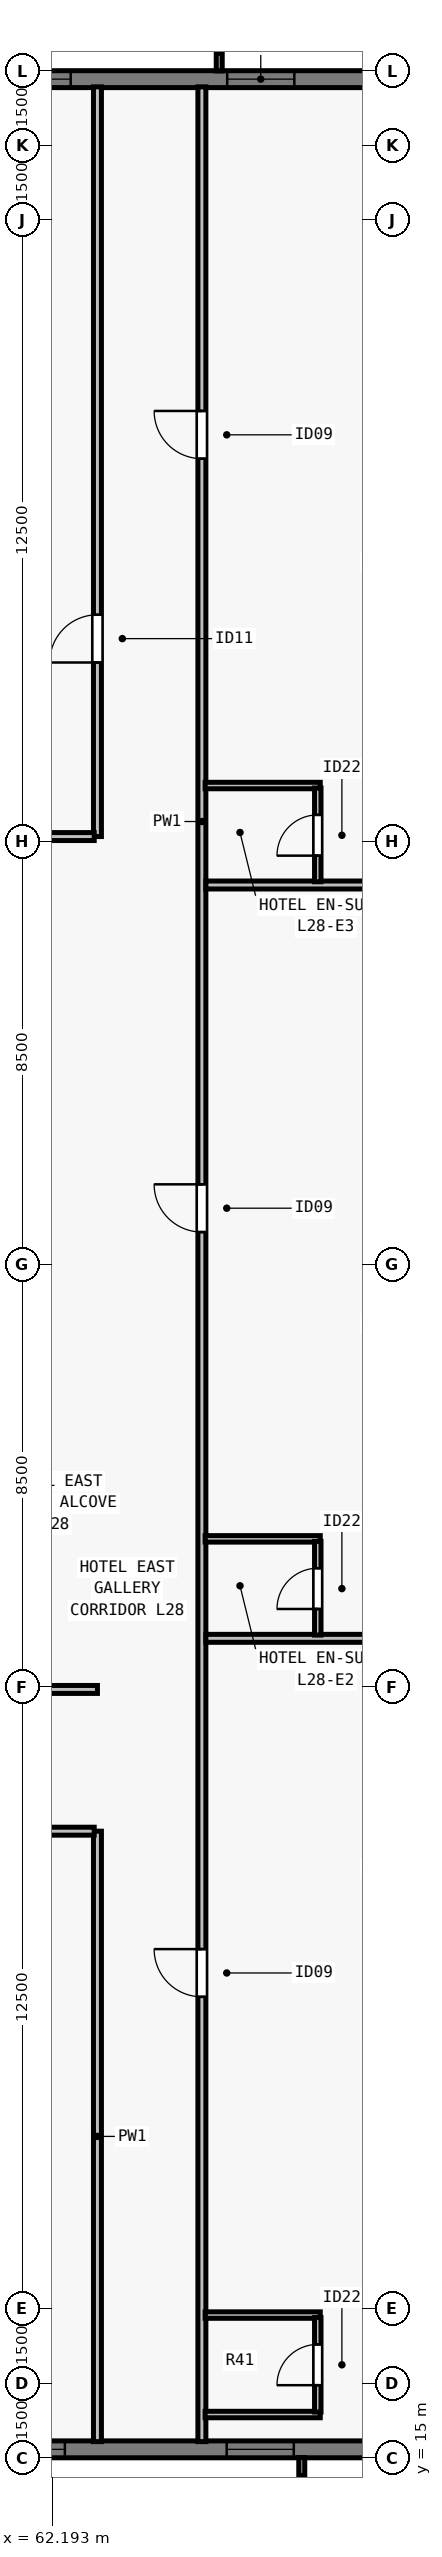
"""IFC4 building model, lengths in metres.
Left out: names, types, materials, properties, quantities, classifications, styles, units other than length and angle.
Written with IfcOpenShell. Run it as: python <this file> out.ifc"""

import sys

from ifc_helpers import new_model, si_unit, direction, frame, frame_2d, origin, place, context, subcontext, project, spatial, rectangle, extrude, element, fill, save


model = new_model("IFC4")
c1 = context("Model", 3, precision=1e-05, world=origin(), true_north=direction((0.0, 1.0)))
c2 = subcontext(c1, "Body", "Model", "MODEL_VIEW")
j1 = project(units=[si_unit("LENGTHUNIT", "METRE"), si_unit("PLANEANGLEUNIT", "RADIAN")], contexts=[c1])
p1 = place(None, origin())
s1 = spatial("IfcSite", under=j1, at=p1, CompositionType="ELEMENT")
p2 = place(p1, origin())
s2 = spatial("IfcBuilding", under=s1, at=p2, CompositionType="ELEMENT")
p3 = place(p2, frame((0.0, 0.0, 106.0)))
s3 = spatial("IfcBuildingStorey", under=s2, at=p3, CompositionType="ELEMENT", Elevation=106.0)
p4 = place(p3, frame((45.0, 62.83, 0.0), z_axis=(0.0, 0.0, 1.0), x_axis=(1.0, 0.0, 0.0)))
e1 = element("IfcWall", 1, at=p4, inside=s3, PredefinedType="SOLIDWALL", context=c2, shape_type="SweptSolid", body=[
    extrude(rectangle(XDim=26.682, YDim=0.34, at=frame_2d((13.341, 0.0))), origin(), (0.0, 0.0, 1.0), 3.28),
])
p5 = place(p4, frame((5.073, 0.0, 0.8)))
e2 = element("IfcOpeningElement", 2, at=p5, cuts=e1, PredefinedType="OPENING", context=c2, shape_type="SweptSolid", body=[
    extrude(rectangle(XDim=1.35, YDim=1.66, at=frame_2d((0.675, 0.83))), frame((0.0, 0.18, 0.0), z_axis=(0.0, -1.0, 0.0), x_axis=(1.0, 0.0, 0.0)), (0.0, 0.0, 1.0), 0.36),
])
p6 = place(p4, frame((8.219, 0.0, 0.8)))
e3 = element("IfcOpeningElement", 3, at=p6, cuts=e1, PredefinedType="OPENING", context=c2, shape_type="SweptSolid", body=[
    extrude(rectangle(XDim=1.75, YDim=1.66, at=frame_2d((0.875, 0.83))), frame((0.0, 0.18, 0.0), z_axis=(0.0, -1.0, 0.0), x_axis=(1.0, 0.0, 0.0)), (0.0, 0.0, 1.0), 0.36),
])
p7 = place(p4, frame((12.666, 0.0, 0.8)))
e4 = element("IfcOpeningElement", 4, at=p7, cuts=e1, PredefinedType="OPENING", context=c2, shape_type="SweptSolid", body=[
    extrude(rectangle(XDim=1.35, YDim=1.66, at=frame_2d((0.675, 0.83))), frame((0.0, 0.18, 0.0), z_axis=(0.0, -1.0, 0.0), x_axis=(1.0, 0.0, 0.0)), (0.0, 0.0, 1.0), 0.36),
])
p8 = place(p4, frame((15.812, 0.0, 0.8)))
e5 = element("IfcOpeningElement", 5, at=p8, cuts=e1, PredefinedType="OPENING", context=c2, shape_type="SweptSolid", body=[
    extrude(rectangle(XDim=1.75, YDim=1.66, at=frame_2d((0.875, 0.83))), frame((0.0, 0.18, 0.0), z_axis=(0.0, -1.0, 0.0), x_axis=(1.0, 0.0, 0.0)), (0.0, 0.0, 1.0), 0.36),
])
p9 = place(p4, frame((20.709, 0.0, 0.8)))
e6 = element("IfcOpeningElement", 6, at=p9, cuts=e1, PredefinedType="OPENING", context=c2, shape_type="SweptSolid", body=[
    extrude(rectangle(XDim=1.35, YDim=1.66, at=frame_2d((0.675, 0.83))), frame((0.0, 0.18, 0.0), z_axis=(0.0, -1.0, 0.0), x_axis=(1.0, 0.0, 0.0)), (0.0, 0.0, 1.0), 0.36),
])
p10 = place(p3, frame((72.0, 15.17, 0.0), z_axis=(0.0, 0.0, 1.0), x_axis=(-1.0, 0.0, 0.0)))
e7 = element("IfcWall", 7, at=p10, inside=s3, PredefinedType="SOLIDWALL", context=c2, shape_type="SweptSolid", body=[
    extrude(rectangle(XDim=39.682, YDim=0.34, at=frame_2d((19.841, 0.0))), origin(), (0.0, 0.0, 1.0), 3.28),
])
p11 = place(p10, frame((4.952, 0.0, 0.8)))
e8 = element("IfcOpeningElement", 8, at=p11, cuts=e7, PredefinedType="OPENING", context=c2, shape_type="SweptSolid", body=[
    extrude(rectangle(XDim=1.35, YDim=1.66, at=frame_2d((0.675, 0.83))), frame((0.0, 0.18, 0.0), z_axis=(0.0, -1.0, 0.0), x_axis=(1.0, 0.0, 0.0)), (0.0, 0.0, 1.0), 0.36),
])
p12 = place(p10, frame((9.555, 0.0, 0.8)))
e9 = element("IfcOpeningElement", 9, at=p12, cuts=e7, PredefinedType="OPENING", context=c2, shape_type="SweptSolid", body=[
    extrude(rectangle(XDim=1.75, YDim=1.66, at=frame_2d((0.875, 0.83))), frame((0.0, 0.18, 0.0), z_axis=(0.0, -1.0, 0.0), x_axis=(1.0, 0.0, 0.0)), (0.0, 0.0, 1.0), 0.36),
])
p13 = place(p10, frame((12.059, 0.0, 0.8)))
e10 = element("IfcOpeningElement", 10, at=p13, cuts=e7, PredefinedType="OPENING", context=c2, shape_type="SweptSolid", body=[
    extrude(rectangle(XDim=1.35, YDim=1.66, at=frame_2d((0.675, 0.83))), frame((0.0, 0.18, 0.0), z_axis=(0.0, -1.0, 0.0), x_axis=(1.0, 0.0, 0.0)), (0.0, 0.0, 1.0), 0.36),
])
p14 = place(p10, frame((16.262, 0.0, 0.8)))
e11 = element("IfcOpeningElement", 11, at=p14, cuts=e7, PredefinedType="OPENING", context=c2, shape_type="SweptSolid", body=[
    extrude(rectangle(XDim=1.75, YDim=1.66, at=frame_2d((0.875, 0.83))), frame((0.0, 0.18, 0.0), z_axis=(0.0, -1.0, 0.0), x_axis=(1.0, 0.0, 0.0)), (0.0, 0.0, 1.0), 0.36),
])
p15 = place(p10, frame((18.716, 0.0, 0.8)))
e12 = element("IfcOpeningElement", 12, at=p15, cuts=e7, PredefinedType="OPENING", context=c2, shape_type="SweptSolid", body=[
    extrude(rectangle(XDim=1.35, YDim=1.66, at=frame_2d((0.675, 0.83))), frame((0.0, 0.18, 0.0), z_axis=(0.0, -1.0, 0.0), x_axis=(1.0, 0.0, 0.0)), (0.0, 0.0, 1.0), 0.36),
])
p16 = place(p10, frame((22.07, 0.0, 0.8)))
e13 = element("IfcOpeningElement", 13, at=p16, cuts=e7, PredefinedType="OPENING", context=c2, shape_type="SweptSolid", body=[
    extrude(rectangle(XDim=1.75, YDim=1.66, at=frame_2d((0.875, 0.83))), frame((0.0, 0.18, 0.0), z_axis=(0.0, -1.0, 0.0), x_axis=(1.0, 0.0, 0.0)), (0.0, 0.0, 1.0), 0.36),
])
p17 = place(p10, frame((26.273, 0.0, 0.8)))
e14 = element("IfcOpeningElement", 14, at=p17, cuts=e7, PredefinedType="OPENING", context=c2, shape_type="SweptSolid", body=[
    extrude(rectangle(XDim=1.35, YDim=1.66, at=frame_2d((0.675, 0.83))), frame((0.0, 0.18, 0.0), z_axis=(0.0, -1.0, 0.0), x_axis=(1.0, 0.0, 0.0)), (0.0, 0.0, 1.0), 0.36),
])
p18 = place(p10, frame((28.777, 0.0, 0.8)))
e15 = element("IfcOpeningElement", 15, at=p18, cuts=e7, PredefinedType="OPENING", context=c2, shape_type="SweptSolid", body=[
    extrude(rectangle(XDim=1.75, YDim=1.66, at=frame_2d((0.875, 0.83))), frame((0.0, 0.18, 0.0), z_axis=(0.0, -1.0, 0.0), x_axis=(1.0, 0.0, 0.0)), (0.0, 0.0, 1.0), 0.36),
])
p19 = place(p10, frame((33.83, 0.0, 0.8)))
e16 = element("IfcOpeningElement", 16, at=p19, cuts=e7, PredefinedType="OPENING", context=c2, shape_type="SweptSolid", body=[
    extrude(rectangle(XDim=1.35, YDim=1.66, at=frame_2d((0.675, 0.83))), frame((0.0, 0.18, 0.0), z_axis=(0.0, -1.0, 0.0), x_axis=(1.0, 0.0, 0.0)), (0.0, 0.0, 1.0), 0.36),
])
p20 = place(p3, frame((65.2, 15.325, 0.0), z_axis=(0.0, 0.0, 1.0), x_axis=(0.0, 1.0, 0.0)))
e17 = element("IfcWall", 17, at=p20, inside=s3, PredefinedType="PARTITIONING", context=c2, shape_type="SweptSolid", body=[
    extrude(rectangle(XDim=47.35, YDim=0.16, at=frame_2d((23.675, 0.0))), origin(), (0.0, 0.0, 1.0), 2.555),
])
p21 = place(p20, frame((8.944, 0.0, 0.0)))
e18 = element("IfcOpeningElement", 18, at=p21, cuts=e17, PredefinedType="OPENING", context=c2, shape_type="SweptSolid", body=[
    extrude(rectangle(XDim=0.96, YDim=2.15, at=frame_2d((0.48, 1.075))), frame((0.0, 0.09, 0.0), z_axis=(0.0, -1.0, 0.0), x_axis=(1.0, 0.0, 0.0)), (0.0, 0.0, 1.0), 0.18),
])
p22 = place(p20, frame((24.322, 0.0, 0.0)))
e19 = element("IfcOpeningElement", 19, at=p22, cuts=e17, PredefinedType="OPENING", context=c2, shape_type="SweptSolid", body=[
    extrude(rectangle(XDim=0.96, YDim=2.15, at=frame_2d((0.48, 1.075))), frame((0.0, 0.09, 0.0), z_axis=(0.0, -1.0, 0.0), x_axis=(1.0, 0.0, 0.0)), (0.0, 0.0, 1.0), 0.18),
])
p23 = place(p20, frame((39.873, 0.0, 0.0)))
e20 = element("IfcOpeningElement", 20, at=p23, cuts=e17, PredefinedType="OPENING", context=c2, shape_type="SweptSolid", body=[
    extrude(rectangle(XDim=0.96, YDim=2.15, at=frame_2d((0.48, 1.075))), frame((0.0, 0.09, 0.0), z_axis=(0.0, -1.0, 0.0), x_axis=(1.0, 0.0, 0.0)), (0.0, 0.0, 1.0), 0.18),
])
p24 = place(p3, frame((63.1, 15.325, 0.0), z_axis=(0.0, 0.0, 1.0), x_axis=(0.0, 1.0, 0.0)))
e21 = element("IfcWall", 21, at=p24, inside=s3, PredefinedType="PARTITIONING", context=c2, shape_type="SweptSolid", body=[
    extrude(rectangle(XDim=12.275, YDim=0.16, at=frame_2d((6.138, 0.0))), origin(), (0.0, 0.0, 1.0), 2.555),
])
p25 = place(p3, frame((63.1, 47.6, 0.0), z_axis=(0.0, 0.0, 1.0), x_axis=(0.0, 1.0, 0.0)))
e22 = element("IfcWall", 22, at=p25, inside=s3, PredefinedType="PARTITIONING", context=c2, shape_type="SweptSolid", body=[
    extrude(rectangle(XDim=15.075, YDim=0.16, at=frame_2d((7.538, 0.0))), origin(), (0.0, 0.0, 1.0), 2.555),
])
p26 = place(p25, frame((3.5, 0.0, 0.0)))
e23 = element("IfcOpeningElement", 23, at=p26, cuts=e22, PredefinedType="OPENING", context=c2, shape_type="SweptSolid", body=[
    extrude(rectangle(XDim=0.96, YDim=2.12, at=frame_2d((0.48, 1.06))), frame((0.0, 0.09, 0.0), z_axis=(0.0, -1.0, 0.0), x_axis=(1.0, 0.0, 0.0)), (0.0, 0.0, 1.0), 0.18),
])
p27 = place(p3, frame((60.765, 30.45, 0.0), z_axis=(0.0, 0.0, 1.0), x_axis=(1.0, 0.0, 0.0)))
e24 = element("IfcWall", 24, at=p27, inside=s3, PredefinedType="PARTITIONING", context=c2, shape_type="SweptSolid", body=[
    extrude(rectangle(XDim=2.335, YDim=0.16, at=frame_2d((1.167, 0.0))), origin(), (0.0, 0.0, 1.0), 3.28),
])
p28 = place(p3, frame((60.765, 47.6, 0.0), z_axis=(0.0, 0.0, 1.0), x_axis=(1.0, 0.0, 0.0)))
e25 = element("IfcWall", 25, at=p28, inside=s3, PredefinedType="PARTITIONING", context=c2, shape_type="SweptSolid", body=[
    extrude(rectangle(XDim=2.27, YDim=0.16, at=frame_2d((1.135, 0.0))), origin(), (0.0, 0.0, 1.0), 3.28),
])
p29 = place(p3, frame((40.965, 27.6, 0.0), z_axis=(0.0, 0.0, 1.0), x_axis=(1.0, 0.0, 0.0)))
e26 = element("IfcWall", 26, at=p29, inside=s3, PredefinedType="PARTITIONING", context=c2, shape_type="SweptSolid", body=[
    extrude(rectangle(XDim=22.07, YDim=0.16, at=frame_2d((11.035, 0.0))), origin(), (0.0, 0.0, 1.0), 3.28),
])
p30 = place(p29, frame((6.085, 0.0, 0.0)))
e27 = element("IfcOpeningElement", 27, at=p30, cuts=e26, PredefinedType="OPENING", context=c2, shape_type="SweptSolid", body=[
    extrude(rectangle(XDim=0.96, YDim=2.15, at=frame_2d((0.48, 1.075))), frame((0.0, 0.09, 0.0), z_axis=(0.0, -1.0, 0.0), x_axis=(1.0, 0.0, 0.0)), (0.0, 0.0, 1.0), 0.18),
])
p31 = place(p29, frame((16.88, 0.0, 0.0)))
e28 = element("IfcOpeningElement", 28, at=p31, cuts=e26, PredefinedType="OPENING", context=c2, shape_type="SweptSolid", body=[
    extrude(rectangle(XDim=0.96, YDim=2.15, at=frame_2d((0.48, 1.075))), frame((0.0, 0.09, 0.0), z_axis=(0.0, -1.0, 0.0), x_axis=(1.0, 0.0, 0.0)), (0.0, 0.0, 1.0), 0.18),
])
for number, where, z_axis, x_axis in (
    (29, (65.265, 15.87, 0.0), (0.0, 0.0, 1.0), (1.0, 0.0, 0.0)),
    (30, (65.265, 17.87, 0.0), (0.0, 0.0, 1.0), (1.0, 0.0, 0.0)),
):
    element("IfcWall", number, at=place(p3, frame(where, z_axis=z_axis, x_axis=x_axis)), inside=s3, PredefinedType="PLUMBINGWALL", context=c2, shape_type="SweptSolid", body=[
        extrude(rectangle(XDim=2.315, YDim=0.13, at=frame_2d((1.158, 0.0))), origin(), (0.0, 0.0, 1.0), 3.28),
    ])
p32 = place(p3, frame((67.53, 15.92, 0.0), z_axis=(0.0, 0.0, 1.0), x_axis=(0.0, 1.0, 0.0)))
e31 = element("IfcWall", 31, at=p32, inside=s3, PredefinedType="PLUMBINGWALL", context=c2, shape_type="SweptSolid", body=[
    extrude(rectangle(XDim=1.9, YDim=0.13, at=frame_2d((0.95, 0.0))), origin(), (0.0, 0.0, 1.0), 3.28),
])
p33 = place(p32, frame((0.54, 0.0, 0.0)))
e32 = element("IfcOpeningElement", 32, at=p33, cuts=e31, PredefinedType="OPENING", context=c2, shape_type="SweptSolid", body=[
    extrude(rectangle(XDim=0.82, YDim=2.1, at=frame_2d((0.41, 1.05))), frame((0.0, 0.075, 0.0), z_axis=(0.0, -1.0, 0.0), x_axis=(1.0, 0.0, 0.0)), (0.0, 0.0, 1.0), 0.15),
])
p34 = place(p3, frame((65.28, 31.478, 0.0), z_axis=(0.0, 0.0, 1.0), x_axis=(1.0, 0.0, 0.0)))
e33 = element("IfcWall", 33, at=p34, inside=s3, PredefinedType="PARTITIONING", context=c2, shape_type="SweptSolid", body=[
    extrude(rectangle(XDim=10.395, YDim=0.16, at=frame_2d((5.198, 0.0))), origin(), (0.0, 0.0, 1.0), 3.28),
])
p35 = place(p3, frame((65.265, 33.478, 0.0), z_axis=(0.0, 0.0, 1.0), x_axis=(1.0, 0.0, 0.0)))
e34 = element("IfcWall", 34, at=p35, inside=s3, PredefinedType="PLUMBINGWALL", context=c2, shape_type="SweptSolid", body=[
    extrude(rectangle(XDim=2.315, YDim=0.13, at=frame_2d((1.158, 0.0))), origin(), (0.0, 0.0, 1.0), 3.28),
])
p36 = place(p3, frame((67.53, 31.543, 0.0), z_axis=(0.0, 0.0, 1.0), x_axis=(0.0, 1.0, 0.0)))
e35 = element("IfcWall", 35, at=p36, inside=s3, PredefinedType="PLUMBINGWALL", context=c2, shape_type="SweptSolid", body=[
    extrude(rectangle(XDim=1.885, YDim=0.13, at=frame_2d((0.942, 0.0))), origin(), (0.0, 0.0, 1.0), 3.28),
])
p37 = place(p36, frame((0.525, 0.0, 0.0)))
e36 = element("IfcOpeningElement", 36, at=p37, cuts=e35, PredefinedType="OPENING", context=c2, shape_type="SweptSolid", body=[
    extrude(rectangle(XDim=0.82, YDim=2.1, at=frame_2d((0.41, 1.05))), frame((0.0, 0.075, 0.0), z_axis=(0.0, -1.0, 0.0), x_axis=(1.0, 0.0, 0.0)), (0.0, 0.0, 1.0), 0.15),
])
p38 = place(p3, frame((65.28, 46.626, 0.0), z_axis=(0.0, 0.0, 1.0), x_axis=(1.0, 0.0, 0.0)))
e37 = element("IfcWall", 37, at=p38, inside=s3, PredefinedType="PARTITIONING", context=c2, shape_type="SweptSolid", body=[
    extrude(rectangle(XDim=10.395, YDim=0.16, at=frame_2d((5.198, 0.0))), origin(), (0.0, 0.0, 1.0), 3.28),
])
p39 = place(p3, frame((65.265, 48.626, 0.0), z_axis=(0.0, 0.0, 1.0), x_axis=(1.0, 0.0, 0.0)))
e38 = element("IfcWall", 38, at=p39, inside=s3, PredefinedType="PLUMBINGWALL", context=c2, shape_type="SweptSolid", body=[
    extrude(rectangle(XDim=2.315, YDim=0.13, at=frame_2d((1.158, 0.0))), origin(), (0.0, 0.0, 1.0), 3.28),
])
p40 = place(p3, frame((67.53, 46.691, 0.0), z_axis=(0.0, 0.0, 1.0), x_axis=(0.0, 1.0, 0.0)))
e39 = element("IfcWall", 39, at=p40, inside=s3, PredefinedType="PLUMBINGWALL", context=c2, shape_type="SweptSolid", body=[
    extrude(rectangle(XDim=1.885, YDim=0.13, at=frame_2d((0.942, 0.0))), origin(), (0.0, 0.0, 1.0), 3.28),
])
p41 = place(p40, frame((0.525, 0.0, 0.0)))
e40 = element("IfcOpeningElement", 40, at=p41, cuts=e39, PredefinedType="OPENING", context=c2, shape_type="SweptSolid", body=[
    extrude(rectangle(XDim=0.82, YDim=2.1, at=frame_2d((0.41, 1.05))), frame((0.0, 0.075, 0.0), z_axis=(0.0, -1.0, 0.0), x_axis=(1.0, 0.0, 0.0)), (0.0, 0.0, 1.0), 0.15),
])
p42 = place(p8, origin())
e41 = element("IfcWindow", 41, at=p42, inside=s3, PartitioningType="SINGLE_PANEL", PredefinedType="WINDOW", context=c2, shape_type="SweptSolid", body=[
    extrude(rectangle(XDim=1.75, YDim=1.66, at=frame_2d((0.875, 0.83))), frame((0.0, -0.05, 0.0), z_axis=(0.0, -1.0, 0.0), x_axis=(1.0, 0.0, 0.0)), (0.0, 0.0, 1.0), 0.06),
])
fill(e5, e41)
p43 = place(p9, origin())
e42 = element("IfcWindow", 42, at=p43, inside=s3, PartitioningType="SINGLE_PANEL", PredefinedType="WINDOW", context=c2, shape_type="SweptSolid", body=[
    extrude(rectangle(XDim=1.35, YDim=1.66, at=frame_2d((0.675, 0.83))), frame((0.0, -0.05, 0.0), z_axis=(0.0, -1.0, 0.0), x_axis=(1.0, 0.0, 0.0)), (0.0, 0.0, 1.0), 0.06),
])
fill(e6, e42)
p44 = place(p11, origin())
e43 = element("IfcWindow", 43, at=p44, inside=s3, PartitioningType="SINGLE_PANEL", PredefinedType="WINDOW", context=c2, shape_type="SweptSolid", body=[
    extrude(rectangle(XDim=1.35, YDim=1.66, at=frame_2d((0.675, 0.83))), frame((0.0, -0.05, 0.0), z_axis=(0.0, -1.0, 0.0), x_axis=(1.0, 0.0, 0.0)), (0.0, 0.0, 1.0), 0.06),
])
fill(e8, e43)
p45 = place(p12, origin())
e44 = element("IfcWindow", 44, at=p45, inside=s3, PartitioningType="SINGLE_PANEL", PredefinedType="WINDOW", context=c2, shape_type="SweptSolid", body=[
    extrude(rectangle(XDim=1.75, YDim=1.66, at=frame_2d((0.875, 0.83))), frame((0.0, -0.05, 0.0), z_axis=(0.0, -1.0, 0.0), x_axis=(1.0, 0.0, 0.0)), (0.0, 0.0, 1.0), 0.06),
])
fill(e9, e44)
p46 = place(p26, origin())
e45 = element("IfcDoor", 45, at=p46, inside=s3, OperationType="SINGLE_SWING_LEFT", PredefinedType="DOOR", context=c2, shape_type="SweptSolid", body=[
    extrude(rectangle(XDim=0.96, YDim=2.12, at=frame_2d((0.48, 1.06))), frame((0.0, 0.025, 0.0), z_axis=(0.0, -1.0, 0.0), x_axis=(1.0, 0.0, 0.0)), (0.0, 0.0, 1.0), 0.05),
])
fill(e23, e45)
p47 = place(p33, origin())
e46 = element("IfcDoor", 46, at=p47, inside=s3, OperationType="SINGLE_SWING_LEFT", PredefinedType="DOOR", context=c2, shape_type="SweptSolid", body=[
    extrude(rectangle(XDim=0.82, YDim=2.1, at=frame_2d((0.41, 1.05))), frame((0.0, 0.025, 0.0), z_axis=(0.0, -1.0, 0.0), x_axis=(1.0, 0.0, 0.0)), (0.0, 0.0, 1.0), 0.05),
])
fill(e32, e46)
p48 = place(p21, origin())
e47 = element("IfcDoor", 47, at=p48, inside=s3, OperationType="SINGLE_SWING_RIGHT", PredefinedType="DOOR", context=c2, shape_type="SweptSolid", body=[
    extrude(rectangle(XDim=0.96, YDim=2.15, at=frame_2d((0.48, 1.075))), frame((0.0, 0.025, 0.0), z_axis=(0.0, -1.0, 0.0), x_axis=(1.0, 0.0, 0.0)), (0.0, 0.0, 1.0), 0.05),
])
fill(e18, e47)
p49 = place(p37, origin())
e48 = element("IfcDoor", 48, at=p49, inside=s3, OperationType="SINGLE_SWING_LEFT", PredefinedType="DOOR", context=c2, shape_type="SweptSolid", body=[
    extrude(rectangle(XDim=0.82, YDim=2.1, at=frame_2d((0.41, 1.05))), frame((0.0, 0.025, 0.0), z_axis=(0.0, -1.0, 0.0), x_axis=(1.0, 0.0, 0.0)), (0.0, 0.0, 1.0), 0.05),
])
fill(e36, e48)
p50 = place(p22, origin())
e49 = element("IfcDoor", 49, at=p50, inside=s3, OperationType="SINGLE_SWING_RIGHT", PredefinedType="DOOR", context=c2, shape_type="SweptSolid", body=[
    extrude(rectangle(XDim=0.96, YDim=2.15, at=frame_2d((0.48, 1.075))), frame((0.0, 0.025, 0.0), z_axis=(0.0, -1.0, 0.0), x_axis=(1.0, 0.0, 0.0)), (0.0, 0.0, 1.0), 0.05),
])
fill(e19, e49)
p51 = place(p41, origin())
e50 = element("IfcDoor", 50, at=p51, inside=s3, OperationType="SINGLE_SWING_LEFT", PredefinedType="DOOR", context=c2, shape_type="SweptSolid", body=[
    extrude(rectangle(XDim=0.82, YDim=2.1, at=frame_2d((0.41, 1.05))), frame((0.0, 0.025, 0.0), z_axis=(0.0, -1.0, 0.0), x_axis=(1.0, 0.0, 0.0)), (0.0, 0.0, 1.0), 0.05),
])
fill(e40, e50)
p52 = place(p23, origin())
e51 = element("IfcDoor", 51, at=p52, inside=s3, OperationType="SINGLE_SWING_RIGHT", PredefinedType="DOOR", context=c2, shape_type="SweptSolid", body=[
    extrude(rectangle(XDim=0.96, YDim=2.15, at=frame_2d((0.48, 1.075))), frame((0.0, 0.025, 0.0), z_axis=(0.0, -1.0, 0.0), x_axis=(1.0, 0.0, 0.0)), (0.0, 0.0, 1.0), 0.05),
])
fill(e20, e51)
save(model, sys.argv[1])
